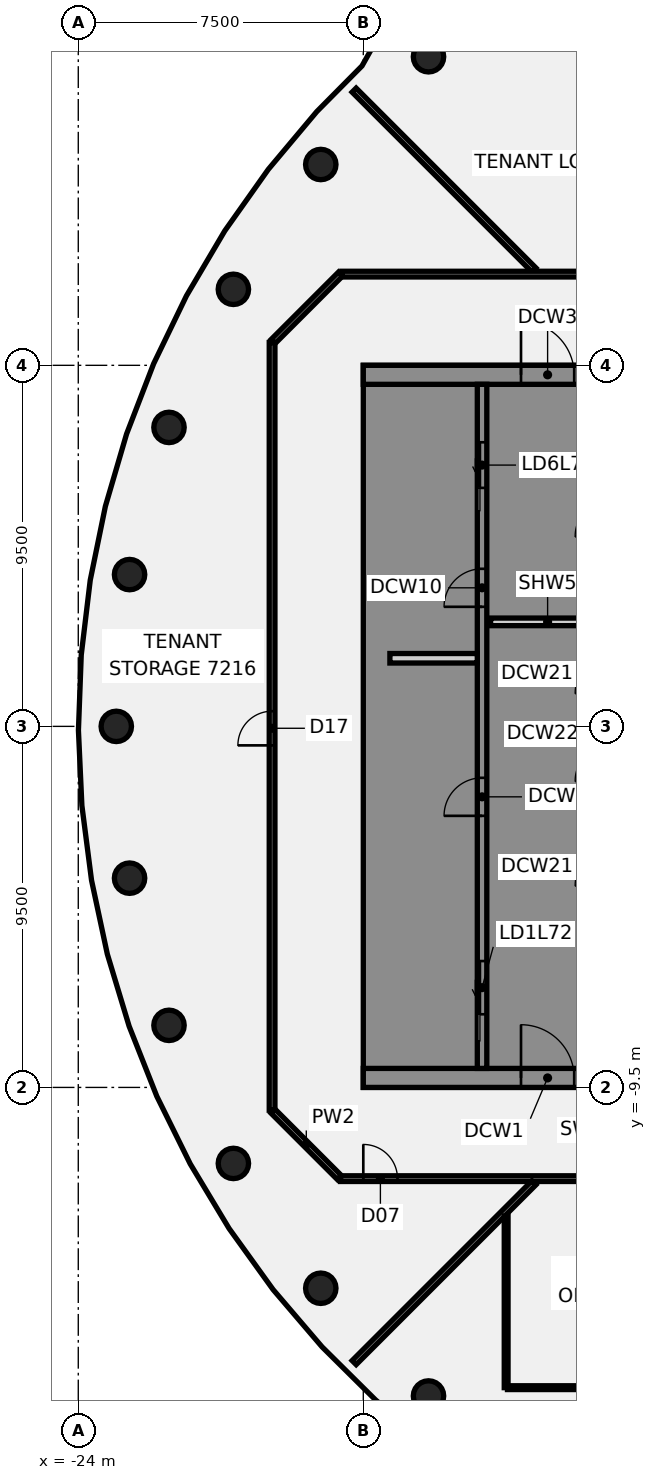
"""IFC4 building model, lengths in metres.
Left out: names, types, materials, properties, quantities, classifications, styles, units other than length and angle.
Written with IfcOpenShell. Run it as: python <this file> out.ifc"""

import sys

from ifc_helpers import new_model, si_unit, direction, frame, frame_2d, origin, origin_2d, place, context, subcontext, project, spatial, polyline, rectangle, circle, outline, extrude, element, fill, save


model = new_model("IFC4")
c1 = context("Model", 3, precision=1e-05, world=origin(), true_north=direction((0.0, 1.0)))
c2 = subcontext(c1, "Body", "Model", "MODEL_VIEW")
j1 = project(units=[si_unit("LENGTHUNIT", "METRE"), si_unit("PLANEANGLEUNIT", "RADIAN")], contexts=[c1])
p1 = place(None, origin())
s1 = spatial("IfcSite", under=j1, at=p1, CompositionType="ELEMENT")
p2 = place(p1, origin())
s2 = spatial("IfcBuilding", under=s1, at=p2, CompositionType="ELEMENT")
p3 = place(p2, frame((0.0, 0.0, 287.4)))
s3 = spatial("IfcBuildingStorey", under=s2, at=p3, CompositionType="ELEMENT", Elevation=287.4)
for number, where, z_axis, x_axis in (
    (1, (-14.784, 17.619, -0.2), (0.0, 0.0, 1.0), (1.0, 0.0, 0.0)),
    (2, (-17.619, 14.784, -0.2), (0.0, 0.0, 1.0), (1.0, 0.0, 0.0)),
    (3, (-19.919, 11.5, -0.2), (0.0, 0.0, 1.0), (1.0, 0.0, 0.0)),
    (4, (-21.613, 7.866, -0.2), (0.0, 0.0, 1.0), (1.0, 0.0, 0.0)),
    (5, (-22.651, 3.994, -0.2), (0.0, 0.0, 1.0), (1.0, 0.0, 0.0)),
    (6, (-23.0, 0.0, -0.2), (0.0, 0.0, 1.0), (1.0, 0.0, 0.0)),
    (7, (-22.651, -3.994, -0.2), (0.0, 0.0, 1.0), (1.0, 0.0, 0.0)),
    (8, (-21.613, -7.866, -0.2), (0.0, 0.0, 1.0), (1.0, 0.0, 0.0)),
    (9, (-19.919, -11.5, -0.2), (0.0, 0.0, 1.0), (1.0, 0.0, 0.0)),
    (10, (-17.619, -14.784, -0.2), (0.0, 0.0, 1.0), (1.0, 0.0, 0.0)),
    (11, (-14.784, -17.619, -0.2), (0.0, 0.0, 1.0), (1.0, 0.0, 0.0)),
):
    element("IfcColumn", number, at=place(p3, frame(where, z_axis=z_axis, x_axis=x_axis)), inside=s3, PredefinedType="COLUMN", context=c2, shape_type="SweptSolid", body=[
        extrude(circle(Radius=0.4, at=origin_2d()), origin(), (0.0, 0.0, 1.0), 7.0),
    ])
p4 = place(p3, frame((-18.872, -10.128, 0.0), z_axis=(0.0, 0.0, 1.0), x_axis=(0.707106781187, -0.707106781187, 0.0)))
e12 = element("IfcWall", 12, at=p4, inside=s3, PredefinedType="PARTITIONING", context=c2, shape_type="SweptSolid", body=[
    extrude(rectangle(XDim=2.465, YDim=0.15, at=frame_2d((1.232, 0.0))), origin(), (0.0, 0.0, 1.0), 6.1),
])
p5 = place(p3, frame((-16.741, 16.741, 0.0), z_axis=(0.0, 0.0, 1.0), x_axis=(0.707106781187, -0.707106781187, 0.0)))
e13 = element("IfcWall", 13, at=p5, inside=s3, PredefinedType="PARTITIONING", context=c2, shape_type="SweptSolid", body=[
    extrude(rectangle(XDim=6.692, YDim=0.15, at=frame_2d((3.346, 0.0))), origin(), (0.0, 0.0, 1.0), 6.1),
])
p6 = place(p3, frame((-15.381, 19.775, 0.0), z_axis=(0.0, 0.0, 1.0), x_axis=(0.933309154951, -0.359073838206, 0.0)))
e14 = element("IfcWall", 14, at=p6, inside=s3, PredefinedType="PARTITIONING", context=c2, shape_type="SweptSolid", body=[
    extrude(rectangle(XDim=21.581, YDim=0.15, at=frame_2d((10.79, 0.0))), origin(), (0.0, 0.0, 1.0), 6.1),
])
p7 = place(p3, frame((-17.1, -11.9, 0.0), z_axis=(0.0, 0.0, 1.0), x_axis=(1.0, 0.0, 0.0)))
e15 = element("IfcWall", 15, at=p7, inside=s3, PredefinedType="PARTITIONING", context=c2, shape_type="SweptSolid", body=[
    extrude(rectangle(XDim=34.165, YDim=0.15, at=frame_2d((17.083, 0.0))), origin(), (0.0, 0.0, 1.0), 6.1),
])
p8 = place(p7, frame((7.9, 0.0, 0.0)))
e16 = element("IfcOpeningElement", 16, at=p8, cuts=e15, PredefinedType="OPENING", context=c2, shape_type="SweptSolid", body=[
    extrude(rectangle(XDim=0.9, YDim=2.1, at=frame_2d((0.45, 1.05))), frame((0.0, 0.085, 0.0), z_axis=(0.0, -1.0, 0.0), x_axis=(1.0, 0.0, 0.0)), (0.0, 0.0, 1.0), 0.17),
])
p9 = place(p7, frame((26.241, 0.0, 0.0)))
e17 = element("IfcOpeningElement", 17, at=p9, cuts=e15, PredefinedType="OPENING", context=c2, shape_type="SweptSolid", body=[
    extrude(rectangle(XDim=0.9, YDim=2.1, at=frame_2d((0.45, 1.05))), frame((0.0, 0.085, 0.0), z_axis=(0.0, -1.0, 0.0), x_axis=(1.0, 0.0, 0.0)), (0.0, 0.0, 1.0), 0.17),
])
p10 = place(p7, frame((16.959, 0.0, 0.0)))
e18 = element("IfcOpeningElement", 18, at=p10, cuts=e15, PredefinedType="OPENING", context=c2, shape_type="SweptSolid", body=[
    extrude(rectangle(XDim=1.8, YDim=2.1, at=frame_2d((0.9, 1.05))), frame((0.0, 0.085, 0.0), z_axis=(0.0, -1.0, 0.0), x_axis=(1.0, 0.0, 0.0)), (0.0, 0.0, 1.0), 0.17),
])
p11 = place(p7, frame((0.6, 0.0, 0.0)))
e19 = element("IfcOpeningElement", 19, at=p11, cuts=e15, PredefinedType="OPENING", context=c2, shape_type="SweptSolid", body=[
    extrude(rectangle(XDim=0.9, YDim=2.1, at=frame_2d((0.45, 1.05))), frame((0.0, 0.085, 0.0), z_axis=(0.0, -1.0, 0.0), x_axis=(1.0, 0.0, 0.0)), (0.0, 0.0, 1.0), 0.17),
])
p12 = place(p3, frame((-17.065, 11.9, 0.0), z_axis=(0.0, 0.0, 1.0), x_axis=(1.0, 0.0, 0.0)))
e20 = element("IfcWall", 20, at=p12, inside=s3, PredefinedType="PARTITIONING", context=c2, shape_type="SweptSolid", body=[
    extrude(rectangle(XDim=34.165, YDim=0.15, at=frame_2d((17.083, 0.0))), origin(), (0.0, 0.0, 1.0), 6.1),
])
p13 = place(p12, frame((24.252, 0.0, 0.0)))
e21 = element("IfcOpeningElement", 21, at=p13, cuts=e20, PredefinedType="OPENING", context=c2, shape_type="SweptSolid", body=[
    extrude(rectangle(XDim=1.8, YDim=2.1, at=frame_2d((0.9, 1.05))), frame((0.0, 0.085, 0.0), z_axis=(0.0, -1.0, 0.0), x_axis=(1.0, 0.0, 0.0)), (0.0, 0.0, 1.0), 0.17),
])
p14 = place(p12, frame((31.665, 0.0, 0.0)))
e22 = element("IfcOpeningElement", 22, at=p14, cuts=e20, PredefinedType="OPENING", context=c2, shape_type="SweptSolid", body=[
    extrude(rectangle(XDim=0.9, YDim=2.1, at=frame_2d((0.45, 1.05))), frame((0.0, 0.085, 0.0), z_axis=(0.0, -1.0, 0.0), x_axis=(1.0, 0.0, 0.0)), (0.0, 0.0, 1.0), 0.17),
])
p15 = place(p12, frame((10.415, 0.0, 0.0)))
e23 = element("IfcOpeningElement", 23, at=p15, cuts=e20, PredefinedType="OPENING", context=c2, shape_type="SweptSolid", body=[
    extrude(rectangle(XDim=1.8, YDim=2.1, at=frame_2d((0.9, 1.05))), frame((0.0, 0.085, 0.0), z_axis=(0.0, -1.0, 0.0), x_axis=(1.0, 0.0, 0.0)), (0.0, 0.0, 1.0), 0.17),
])
p16 = place(p3, frame((-12.706, -17.4, 0.0), z_axis=(0.0, 0.0, 1.0), x_axis=(1.0, 0.0, 0.0)))
e24 = element("IfcWall", 24, at=p16, inside=s3, PredefinedType="PARTITIONING", context=c2, shape_type="SweptSolid", body=[
    extrude(rectangle(XDim=5.935, YDim=0.1, at=frame_2d((2.968, 0.0))), origin(), (0.0, 0.0, 1.0), 6.1),
])
p17 = place(p3, frame((-18.872, 10.128, 0.0), z_axis=(0.0, 0.0, 1.0), x_axis=(0.707106781187, 0.707106781187, 0.0)))
e25 = element("IfcWall", 25, at=p17, inside=s3, PredefinedType="PARTITIONING", context=c2, shape_type="SweptSolid", body=[
    extrude(rectangle(XDim=2.505, YDim=0.15, at=frame_2d((1.253, 0.0))), origin(), (0.0, 0.0, 1.0), 6.1),
])
p18 = place(p3, frame((-16.74, -16.74, 0.0), z_axis=(0.0, 0.0, 1.0), x_axis=(0.707106781187, 0.707106781187, 0.0)))
e26 = element("IfcWall", 26, at=p18, inside=s3, PredefinedType="PARTITIONING", context=c2, shape_type="SweptSolid", body=[
    extrude(rectangle(XDim=6.691, YDim=0.15, at=frame_2d((3.345, 0.0))), origin(), (0.0, 0.0, 1.0), 6.1),
])
p19 = place(p3, frame((-18.9, -10.1, 0.0), z_axis=(0.0, 0.0, 1.0), x_axis=(0.0, 1.0, 0.0)))
e27 = element("IfcWall", 27, at=p19, inside=s3, PredefinedType="PARTITIONING", context=c2, shape_type="SweptSolid", body=[
    extrude(rectangle(XDim=20.2, YDim=0.15, at=frame_2d((10.1, 0.0))), origin(), (0.0, 0.0, 1.0), 6.1),
])
p20 = place(p19, frame((9.6, 0.0, 0.0)))
e28 = element("IfcOpeningElement", 28, at=p20, cuts=e27, PredefinedType="OPENING", context=c2, shape_type="SweptSolid", body=[
    extrude(rectangle(XDim=0.9, YDim=2.1, at=frame_2d((0.45, 1.05))), frame((0.0, 0.085, 0.0), z_axis=(0.0, -1.0, 0.0), x_axis=(1.0, 0.0, 0.0)), (0.0, 0.0, 1.0), 0.17),
])
p21 = place(p3, frame((-12.741, -17.4, 0.0), z_axis=(0.0, 0.0, 1.0), x_axis=(0.0, 1.0, 0.0)))
e29 = element("IfcWall", 29, at=p21, inside=s3, PredefinedType="PARTITIONING", context=c2, shape_type="SweptSolid", body=[
    extrude(rectangle(XDim=4.519, YDim=0.1, at=frame_2d((2.259, 0.0))), origin(), (0.0, 0.0, 1.0), 6.1),
])
p22 = place(p3, frame((-16.5, -9.25, 0.0), z_axis=(0.0, 0.0, 1.0), x_axis=(1.0, 0.0, 0.0)))
e30 = element("IfcWall", 30, at=p22, inside=s3, PredefinedType="SHEAR", context=c2, shape_type="SweptSolid", body=[
    extrude(rectangle(XDim=13.0, YDim=0.5, at=frame_2d((6.5, 0.0))), origin(), (0.0, 0.0, 1.0), 6.8),
])
p23 = place(p22, frame((4.15, 0.0, 0.0)))
e31 = element("IfcOpeningElement", 31, at=p23, cuts=e30, PredefinedType="OPENING", context=c2, shape_type="SweptSolid", body=[
    extrude(rectangle(XDim=1.4, YDim=2.1, at=frame_2d((0.7, 1.05))), frame((0.0, 0.26, 0.0), z_axis=(0.0, -1.0, 0.0), x_axis=(1.0, 0.0, 0.0)), (0.0, 0.0, 1.0), 0.52),
])
p24 = place(p22, frame((10.125, 0.0, 0.0)))
e32 = element("IfcOpeningElement", 32, at=p24, cuts=e30, PredefinedType="OPENING", context=c2, shape_type="SweptSolid", body=[
    extrude(rectangle(XDim=1.4, YDim=2.1, at=frame_2d((0.7, 1.05))), frame((0.0, 0.26, 0.0), z_axis=(0.0, -1.0, 0.0), x_axis=(1.0, 0.0, 0.0)), (0.0, 0.0, 1.0), 0.52),
])
p25 = place(p3, frame((-16.5, 9.25, 0.0), z_axis=(0.0, 0.0, 1.0), x_axis=(1.0, 0.0, 0.0)))
e33 = element("IfcWall", 33, at=p25, inside=s3, PredefinedType="SHEAR", context=c2, shape_type="SweptSolid", body=[
    extrude(rectangle(XDim=13.0, YDim=0.5, at=frame_2d((6.5, 0.0))), origin(), (0.0, 0.0, 1.0), 6.8),
])
p26 = place(p25, frame((4.15, 0.0, 0.0)))
e34 = element("IfcOpeningElement", 34, at=p26, cuts=e33, PredefinedType="OPENING", context=c2, shape_type="SweptSolid", body=[
    extrude(rectangle(XDim=1.4, YDim=2.1, at=frame_2d((0.7, 1.05))), frame((0.0, 0.26, 0.0), z_axis=(0.0, -1.0, 0.0), x_axis=(1.0, 0.0, 0.0)), (0.0, 0.0, 1.0), 0.52),
])
p27 = place(p3, frame((-13.15, 2.75, 0.0), z_axis=(0.0, 0.0, 1.0), x_axis=(1.0, 0.0, 0.0)))
e35 = element("IfcWall", 35, at=p27, inside=s3, PredefinedType="PARTITIONING", context=c2, shape_type="SweptSolid", body=[
    extrude(rectangle(XDim=3.0, YDim=0.2, at=frame_2d((1.5, 0.0))), origin(), (0.0, 0.0, 1.0), 6.8),
])
p28 = place(p3, origin())
e36 = element("IfcWall", 36, at=p28, inside=s3, PredefinedType="SHEAR", context=c2, shape_type="SweptSolid", body=[
    extrude(outline(polyline([(-13.5, -8.125), (-16.0, -8.125), (-16.0, -5.625), (-13.5, -5.625), (-13.5, -5.375), (-16.0, -5.375), (-16.0, 5.375), (-13.5, 5.375), (-13.5, 5.625), (-16.0, 5.625), (-16.0, 8.125), (-13.5, 8.125), (-13.5, 9.0), (-16.0, 9.0), (-16.5, 9.0), (-16.5, -9.0), (-16.0, -9.0), (-13.5, -9.0), (-13.5, -8.125)])), origin(), (0.0, 0.0, 1.0), 6.8),
])
p29 = place(p3, frame((-13.375, -9.0, 0.0), z_axis=(0.0, 0.0, 1.0), x_axis=(0.0, 1.0, 0.0)))
e37 = element("IfcWall", 37, at=p29, inside=s3, PredefinedType="SHEAR", context=c2, shape_type="SweptSolid", body=[
    extrude(rectangle(XDim=18.0, YDim=0.25, at=frame_2d((9.0, 0.0))), origin(), (0.0, 0.0, 1.0), 6.8),
])
p30 = place(p29, frame((1.425, 0.0, 0.0)))
e38 = element("IfcOpeningElement", 38, at=p30, cuts=e37, PredefinedType="OPENING", context=c2, shape_type="SweptSolid", body=[
    extrude(rectangle(XDim=1.4, YDim=2.1, at=frame_2d((0.7, 1.05))), frame((0.0, 0.135, 0.0), z_axis=(0.0, -1.0, 0.0), x_axis=(1.0, 0.0, 0.0)), (0.0, 0.0, 1.0), 0.27),
])
p31 = place(p29, frame((15.275, 0.0, 0.0)))
e39 = element("IfcOpeningElement", 39, at=p31, cuts=e37, PredefinedType="OPENING", context=c2, shape_type="SweptSolid", body=[
    extrude(rectangle(XDim=1.2, YDim=2.1, at=frame_2d((0.6, 1.05))), frame((0.0, 0.135, 0.0), z_axis=(0.0, -1.0, 0.0), x_axis=(1.0, 0.0, 0.0)), (0.0, 0.0, 1.0), 0.27),
])
p32 = place(p29, frame((6.646, 0.0, 0.0)))
e40 = element("IfcOpeningElement", 40, at=p32, cuts=e37, PredefinedType="OPENING", context=c2, shape_type="SweptSolid", body=[
    extrude(rectangle(XDim=1.0, YDim=2.1, at=frame_2d((0.5, 1.05))), frame((0.0, 0.135, 0.0), z_axis=(0.0, -1.0, 0.0), x_axis=(1.0, 0.0, 0.0)), (0.0, 0.0, 1.0), 0.27),
])
p33 = place(p29, frame((12.146, 0.0, 0.0)))
e41 = element("IfcOpeningElement", 41, at=p33, cuts=e37, PredefinedType="OPENING", context=c2, shape_type="SweptSolid", body=[
    extrude(rectangle(XDim=1.0, YDim=2.1, at=frame_2d((0.5, 1.05))), frame((0.0, 0.135, 0.0), z_axis=(0.0, -1.0, 0.0), x_axis=(1.0, 0.0, 0.0)), (0.0, 0.0, 1.0), 0.27),
])
p34 = place(p3, frame((-15.8, 1.792, 0.0), z_axis=(0.0, 0.0, 1.0), x_axis=(1.0, 0.0, 0.0)))
e42 = element("IfcWall", 42, at=p34, inside=s3, PredefinedType="PARTITIONING", context=c2, shape_type="SweptSolid", body=[
    extrude(rectangle(XDim=2.3, YDim=0.25, at=frame_2d((1.15, 0.0))), origin(), (0.0, 0.0, 1.0), 6.8),
])
p35 = place(p11, frame((0.9, 0.0, 0.0), z_axis=(0.0, 0.0, 1.0), x_axis=(-1.0, 0.0, 0.0)))
e43 = element("IfcDoor", 43, at=p35, inside=s3, OperationType="SINGLE_SWING_LEFT", PredefinedType="DOOR", context=c2, shape_type="SweptSolid", body=[
    extrude(rectangle(XDim=0.9, YDim=2.1, at=frame_2d((0.45, 1.05))), frame((0.0, 0.025, 0.0), z_axis=(0.0, -1.0, 0.0), x_axis=(1.0, 0.0, 0.0)), (0.0, 0.0, 1.0), 0.05),
])
fill(e19, e43)
p36 = place(p20, origin())
e44 = element("IfcDoor", 44, at=p36, inside=s3, OperationType="SINGLE_SWING_RIGHT", PredefinedType="DOOR", context=c2, shape_type="SweptSolid", body=[
    extrude(rectangle(XDim=0.9, YDim=2.1, at=frame_2d((0.45, 1.05))), frame((0.0, 0.025, 0.0), z_axis=(0.0, -1.0, 0.0), x_axis=(1.0, 0.0, 0.0)), (0.0, 0.0, 1.0), 0.05),
])
fill(e28, e44)
p37 = place(p23, origin())
e45 = element("IfcDoor", 45, at=p37, inside=s3, OperationType="SINGLE_SWING_LEFT", PredefinedType="DOOR", context=c2, shape_type="SweptSolid", body=[
    extrude(rectangle(XDim=1.4, YDim=2.1, at=frame_2d((0.7, 1.05))), frame((0.0, 0.025, 0.0), z_axis=(0.0, -1.0, 0.0), x_axis=(1.0, 0.0, 0.0)), (0.0, 0.0, 1.0), 0.05),
])
fill(e31, e45)
p38 = place(p26, origin())
e46 = element("IfcDoor", 46, at=p38, inside=s3, OperationType="SINGLE_SWING_LEFT", PredefinedType="DOOR", context=c2, shape_type="SweptSolid", body=[
    extrude(rectangle(XDim=1.4, YDim=2.1, at=frame_2d((0.7, 1.05))), frame((0.0, 0.025, 0.0), z_axis=(0.0, -1.0, 0.0), x_axis=(1.0, 0.0, 0.0)), (0.0, 0.0, 1.0), 0.05),
])
fill(e34, e46)
p39 = place(p30, origin())
e47 = element("IfcDoor", 47, at=p39, inside=s3, OperationType="SLIDING_TO_LEFT", PredefinedType="DOOR", context=c2, shape_type="SweptSolid", body=[
    extrude(rectangle(XDim=1.4, YDim=2.1, at=frame_2d((0.7, 1.05))), frame((0.0, 0.025, 0.0), z_axis=(0.0, -1.0, 0.0), x_axis=(1.0, 0.0, 0.0)), (0.0, 0.0, 1.0), 0.05),
])
fill(e38, e47)
p40 = place(p31, origin())
e48 = element("IfcDoor", 48, at=p40, inside=s3, OperationType="SLIDING_TO_LEFT", PredefinedType="DOOR", context=c2, shape_type="SweptSolid", body=[
    extrude(rectangle(XDim=1.2, YDim=2.1, at=frame_2d((0.6, 1.05))), frame((0.0, 0.025, 0.0), z_axis=(0.0, -1.0, 0.0), x_axis=(1.0, 0.0, 0.0)), (0.0, 0.0, 1.0), 0.05),
])
fill(e39, e48)
p41 = place(p32, origin())
e49 = element("IfcDoor", 49, at=p41, inside=s3, OperationType="SINGLE_SWING_LEFT", PredefinedType="DOOR", context=c2, shape_type="SweptSolid", body=[
    extrude(rectangle(XDim=1.0, YDim=2.1, at=frame_2d((0.5, 1.05))), frame((0.0, 0.025, 0.0), z_axis=(0.0, -1.0, 0.0), x_axis=(1.0, 0.0, 0.0)), (0.0, 0.0, 1.0), 0.05),
])
fill(e40, e49)
p42 = place(p33, origin())
e50 = element("IfcDoor", 50, at=p42, inside=s3, OperationType="SINGLE_SWING_LEFT", PredefinedType="DOOR", context=c2, shape_type="SweptSolid", body=[
    extrude(rectangle(XDim=1.0, YDim=2.1, at=frame_2d((0.5, 1.05))), frame((0.0, 0.025, 0.0), z_axis=(0.0, -1.0, 0.0), x_axis=(1.0, 0.0, 0.0)), (0.0, 0.0, 1.0), 0.05),
])
fill(e41, e50)
save(model, sys.argv[1])
